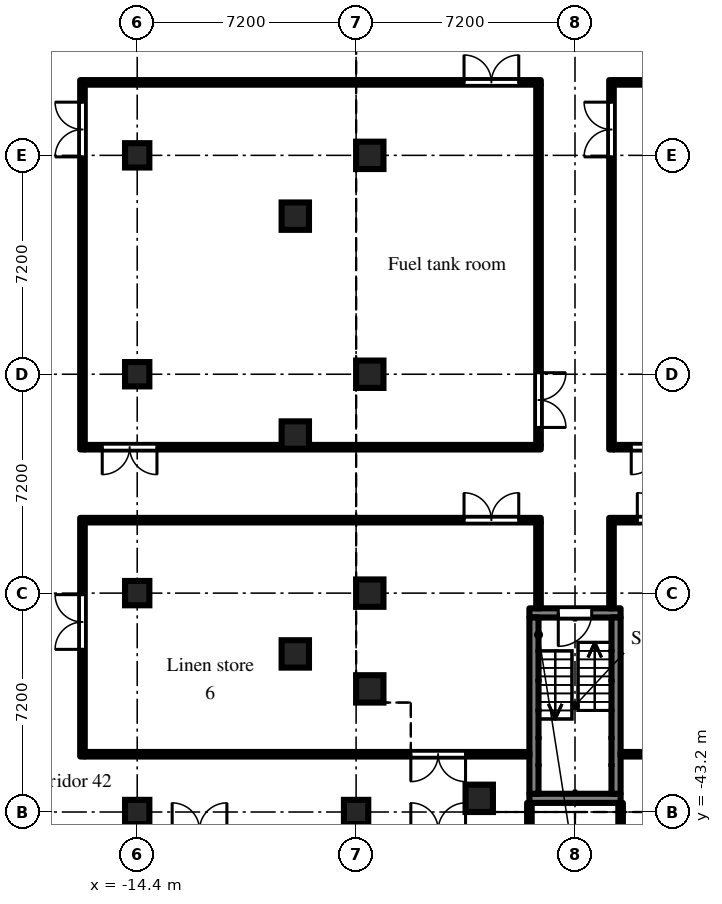
"""IFC4 building model, lengths in metres.
Left out: names, types, materials, properties, quantities, classifications, styles, units other than length and angle.
Written with IfcOpenShell. Run it as: python <this file> out.ifc"""

import sys

from ifc_helpers import new_model, si_unit, direction, frame, frame_2d, origin, origin_2d, place, context, subcontext, project, spatial, rectangle, extrude, element, fill, save


model = new_model("IFC4")
c1 = context("Model", 3, precision=1e-05, world=origin(), true_north=direction((0.0, 1.0)))
c2 = subcontext(c1, "Body", "Model", "MODEL_VIEW")
j1 = project(units=[si_unit("LENGTHUNIT", "METRE"), si_unit("PLANEANGLEUNIT", "RADIAN")], contexts=[c1])
p1 = place(None, origin())
s1 = spatial("IfcSite", under=j1, at=p1, CompositionType="ELEMENT")
p2 = place(p1, origin())
s2 = spatial("IfcBuilding", under=s1, at=p2, CompositionType="ELEMENT")
p3 = place(p2, frame((0.0, 0.0, -4.8)))
s3 = spatial("IfcBuildingStorey", under=s2, at=p3, CompositionType="ELEMENT", Elevation=-4.8)
for number, where, z_axis, x_axis in (
    (1, (-6.75, -39.15, -0.5), (0.0, 0.0, 1.0), (1.0, 0.0, 0.0)),
    (2, (-6.75, -36.0, -0.5), (0.0, 0.0, 1.0), (1.0, 0.0, 0.0)),
    (3, (-6.75, -28.8, -0.5), (0.0, 0.0, 1.0), (1.0, 0.0, 0.0)),
    (4, (-6.75, -21.6, -0.5), (0.0, 0.0, 1.0), (1.0, 0.0, 0.0)),
    (5, (-3.15, -42.75, -0.5), (0.0, 0.0, 1.0), (1.0, 0.0, 0.0)),
):
    element("IfcColumn", number, at=place(p3, frame(where, z_axis=z_axis, x_axis=x_axis)), inside=s3, PredefinedType="COLUMN", context=c2, shape_type="SweptSolid", body=[
        extrude(rectangle(XDim=0.9, YDim=0.9, at=origin_2d()), origin(), (0.0, 0.0, 1.0), 5.3),
    ])
for number, where, z_axis, x_axis in (
    (6, (-14.4, -43.2, -0.5), (0.0, 0.0, 1.0), (1.0, 0.0, 0.0)),
    (7, (-14.4, -36.0, -0.5), (0.0, 0.0, 1.0), (1.0, 0.0, 0.0)),
    (8, (-14.4, -28.8, -0.5), (0.0, 0.0, 1.0), (1.0, 0.0, 0.0)),
    (9, (-14.4, -21.6, -0.5), (0.0, 0.0, 1.0), (1.0, 0.0, 0.0)),
    (10, (-7.2, -43.2, -0.5), (0.0, 0.0, 1.0), (1.0, 0.0, 0.0)),
):
    element("IfcColumn", number, at=place(p3, frame(where, z_axis=z_axis, x_axis=x_axis)), inside=s3, PredefinedType="COLUMN", context=c2, shape_type="SweptSolid", body=[
        extrude(rectangle(XDim=0.8, YDim=0.8, at=origin_2d()), origin(), (0.0, 0.0, 1.0), 5.3),
    ])
for number, where, z_axis, x_axis in (
    (11, (-9.2, -38.0, -0.5), (0.0, 0.0, 1.0), (1.0, 0.0, 0.0)),
    (12, (-9.2, -30.8, -0.5), (0.0, 0.0, 1.0), (1.0, 0.0, 0.0)),
    (13, (-9.2, -23.6, -0.5), (0.0, 0.0, 1.0), (1.0, 0.0, 0.0)),
):
    element("IfcColumn", number, at=place(p3, frame(where, z_axis=z_axis, x_axis=x_axis)), inside=s3, PredefinedType="COLUMN", context=c2, shape_type="SweptSolid", body=[
        extrude(rectangle(XDim=0.9, YDim=0.9, at=origin_2d()), origin(), (0.0, 0.0, 1.0), 5.3),
    ])
p4 = place(p3, frame((-1.5, -36.65, 0.0), z_axis=(0.0, 0.0, 1.0), x_axis=(1.0, 0.0, 0.0)))
e14 = element("IfcWall", 14, at=p4, inside=s3, PredefinedType="SHEAR", context=c2, shape_type="SweptSolid", body=[
    extrude(rectangle(XDim=3.0, YDim=0.3, at=frame_2d((1.5, 0.0))), origin(), (0.0, 0.0, 1.0), 4.35),
])
p5 = place(p4, frame((0.95, 0.0, 0.0)))
e15 = element("IfcOpeningElement", 15, at=p5, cuts=e14, PredefinedType="OPENING", context=c2, shape_type="SweptSolid", body=[
    extrude(rectangle(XDim=1.1, YDim=2.1, at=frame_2d((0.55, 1.05))), frame((0.0, 0.16, 0.0), z_axis=(0.0, -1.0, 0.0), x_axis=(1.0, 0.0, 0.0)), (0.0, 0.0, 1.0), 0.32),
])
p6 = place(p3, frame((-1.5, -42.75, 0.0), z_axis=(0.0, 0.0, 1.0), x_axis=(1.0, 0.0, 0.0)))
e16 = element("IfcWall", 16, at=p6, inside=s3, PredefinedType="SHEAR", context=c2, shape_type="SweptSolid", body=[
    extrude(rectangle(XDim=3.0, YDim=0.3, at=frame_2d((1.5, 0.0))), origin(), (0.0, 0.0, 1.0), 4.35),
])
for number, where, z_axis, x_axis in (
    (17, (-1.35, -36.8, 0.0), (0.0, 0.0, 1.0), (0.0, -1.0, 0.0)),
    (18, (1.35, -36.8, 0.0), (0.0, 0.0, 1.0), (0.0, -1.0, 0.0)),
):
    element("IfcWall", number, at=place(p3, frame(where, z_axis=z_axis, x_axis=x_axis)), inside=s3, PredefinedType="SHEAR", context=c2, shape_type="SweptSolid", body=[
        extrude(rectangle(XDim=5.8, YDim=0.3, at=frame_2d((2.9, 0.0))), origin(), (0.0, 0.0, 1.0), 4.35),
    ])
p7 = place(p3, frame((-16.2, -41.375, 0.0), z_axis=(0.0, 0.0, 1.0), x_axis=(0.0, 1.0, 0.0)))
e19 = element("IfcWall", 19, at=p7, inside=s3, PredefinedType="PARTITIONING", context=c2, shape_type="SweptSolid", body=[
    extrude(rectangle(XDim=7.85, YDim=0.15, at=frame_2d((3.925, 0.0))), origin(), (0.0, 0.0, 1.0), 4.35),
])
p8 = place(p7, frame((3.525, 0.0, 0.0)))
e20 = element("IfcOpeningElement", 20, at=p8, cuts=e19, PredefinedType="OPENING", context=c2, shape_type="SweptSolid", body=[
    extrude(rectangle(XDim=1.8, YDim=2.1, at=frame_2d((0.9, 1.05))), frame((0.0, 0.085, 0.0), z_axis=(0.0, -1.0, 0.0), x_axis=(1.0, 0.0, 0.0)), (0.0, 0.0, 1.0), 0.17),
])
p9 = place(p3, frame((-16.125, -41.3, 0.0), z_axis=(0.0, 0.0, 1.0), x_axis=(1.0, 0.0, 0.0)))
e21 = element("IfcWall", 21, at=p9, inside=s3, PredefinedType="PARTITIONING", context=c2, shape_type="SweptSolid", body=[
    extrude(rectangle(XDim=14.625, YDim=0.15, at=frame_2d((7.312, 0.0))), origin(), (0.0, 0.0, 1.0), 4.35),
])
p10 = place(p9, frame((10.725, 0.0, 0.0)))
e22 = element("IfcOpeningElement", 22, at=p10, cuts=e21, PredefinedType="OPENING", context=c2, shape_type="SweptSolid", body=[
    extrude(rectangle(XDim=1.8, YDim=2.1, at=frame_2d((0.9, 1.05))), frame((0.0, 0.085, 0.0), z_axis=(0.0, -1.0, 0.0), x_axis=(1.0, 0.0, 0.0)), (0.0, 0.0, 1.0), 0.17),
])
p11 = place(p3, frame((-16.125, -33.6, 0.0), z_axis=(0.0, 0.0, 1.0), x_axis=(1.0, 0.0, 0.0)))
e23 = element("IfcWall", 23, at=p11, inside=s3, PredefinedType="PARTITIONING", context=c2, shape_type="SweptSolid", body=[
    extrude(rectangle(XDim=15.0, YDim=0.15, at=frame_2d((7.5, 0.0))), origin(), (0.0, 0.0, 1.0), 4.35),
])
p12 = place(p11, frame((12.475, 0.0, 0.0)))
e24 = element("IfcOpeningElement", 24, at=p12, cuts=e23, PredefinedType="OPENING", context=c2, shape_type="SweptSolid", body=[
    extrude(rectangle(XDim=1.8, YDim=2.1, at=frame_2d((0.9, 1.05))), frame((0.0, 0.085, 0.0), z_axis=(0.0, -1.0, 0.0), x_axis=(1.0, 0.0, 0.0)), (0.0, 0.0, 1.0), 0.17),
])
p13 = place(p3, frame((-16.2, -31.275, 0.0), z_axis=(0.0, 0.0, 1.0), x_axis=(0.0, 1.0, 0.0)))
e25 = element("IfcWall", 25, at=p13, inside=s3, PredefinedType="PARTITIONING", context=c2, shape_type="SweptSolid", body=[
    extrude(rectangle(XDim=12.15, YDim=0.15, at=frame_2d((6.075, 0.0))), origin(), (0.0, 0.0, 1.0), 4.35),
])
p14 = place(p13, frame((9.625, 0.0, 0.0)))
e26 = element("IfcOpeningElement", 26, at=p14, cuts=e25, PredefinedType="OPENING", context=c2, shape_type="SweptSolid", body=[
    extrude(rectangle(XDim=1.8, YDim=2.1, at=frame_2d((0.9, 1.05))), frame((0.0, 0.085, 0.0), z_axis=(0.0, -1.0, 0.0), x_axis=(1.0, 0.0, 0.0)), (0.0, 0.0, 1.0), 0.17),
])
p15 = place(p3, frame((-16.125, -31.2, 0.0), z_axis=(0.0, 0.0, 1.0), x_axis=(1.0, 0.0, 0.0)))
e27 = element("IfcWall", 27, at=p15, inside=s3, PredefinedType="PARTITIONING", context=c2, shape_type="SweptSolid", body=[
    extrude(rectangle(XDim=15.0, YDim=0.15, at=frame_2d((7.5, 0.0))), origin(), (0.0, 0.0, 1.0), 4.35),
])
p16 = place(p15, frame((0.575, 0.0, 0.0)))
e28 = element("IfcOpeningElement", 28, at=p16, cuts=e27, PredefinedType="OPENING", context=c2, shape_type="SweptSolid", body=[
    extrude(rectangle(XDim=1.8, YDim=2.1, at=frame_2d((0.9, 1.05))), frame((0.0, 0.085, 0.0), z_axis=(0.0, -1.0, 0.0), x_axis=(1.0, 0.0, 0.0)), (0.0, 0.0, 1.0), 0.17),
])
p17 = place(p3, frame((-16.125, -19.2, 0.0), z_axis=(0.0, 0.0, 1.0), x_axis=(1.0, 0.0, 0.0)))
e29 = element("IfcWall", 29, at=p17, inside=s3, PredefinedType="PARTITIONING", context=c2, shape_type="SweptSolid", body=[
    extrude(rectangle(XDim=15.0, YDim=0.15, at=frame_2d((7.5, 0.0))), origin(), (0.0, 0.0, 1.0), 4.35),
])
p18 = place(p17, frame((12.475, 0.0, 0.0)))
e30 = element("IfcOpeningElement", 30, at=p18, cuts=e29, PredefinedType="OPENING", context=c2, shape_type="SweptSolid", body=[
    extrude(rectangle(XDim=1.8, YDim=2.1, at=frame_2d((0.9, 1.05))), frame((0.0, 0.085, 0.0), z_axis=(0.0, -1.0, 0.0), x_axis=(1.0, 0.0, 0.0)), (0.0, 0.0, 1.0), 0.17),
])
p19 = place(p3, frame((-1.5, -43.725, 0.0), z_axis=(0.0, 0.0, 1.0), x_axis=(0.0, 1.0, 0.0)))
e31 = element("IfcWall", 31, at=p19, inside=s3, PredefinedType="PARTITIONING", context=c2, shape_type="SweptSolid", body=[
    extrude(rectangle(XDim=0.825, YDim=0.15, at=frame_2d((0.413, 0.0))), origin(), (0.0, 0.0, 1.0), 4.35),
])
p20 = place(p3, frame((-1.2, -36.5, 0.0), z_axis=(0.0, 0.0, 1.0), x_axis=(0.0, 1.0, 0.0)))
e32 = element("IfcWall", 32, at=p20, inside=s3, PredefinedType="PARTITIONING", context=c2, shape_type="SweptSolid", body=[
    extrude(rectangle(XDim=2.825, YDim=0.15, at=frame_2d((1.413, 0.0))), origin(), (0.0, 0.0, 1.0), 4.35),
])
p21 = place(p3, frame((-1.2, -31.125, 0.0), z_axis=(0.0, 0.0, 1.0), x_axis=(0.0, 1.0, 0.0)))
e33 = element("IfcWall", 33, at=p21, inside=s3, PredefinedType="PARTITIONING", context=c2, shape_type="SweptSolid", body=[
    extrude(rectangle(XDim=11.85, YDim=0.15, at=frame_2d((5.925, 0.0))), origin(), (0.0, 0.0, 1.0), 4.35),
])
p22 = place(p21, frame((0.575, 0.0, 0.0)))
e34 = element("IfcOpeningElement", 34, at=p22, cuts=e33, PredefinedType="OPENING", context=c2, shape_type="SweptSolid", body=[
    extrude(rectangle(XDim=1.8, YDim=2.1, at=frame_2d((0.9, 1.05))), frame((0.0, 0.085, 0.0), z_axis=(0.0, -1.0, 0.0), x_axis=(1.0, 0.0, 0.0)), (0.0, 0.0, 1.0), 0.17),
])
p23 = place(p3, frame((1.2, -36.5, 0.0), z_axis=(0.0, 0.0, 1.0), x_axis=(0.0, 1.0, 0.0)))
e35 = element("IfcWall", 35, at=p23, inside=s3, PredefinedType="PARTITIONING", context=c2, shape_type="SweptSolid", body=[
    extrude(rectangle(XDim=2.975, YDim=0.15, at=frame_2d((1.488, 0.0))), origin(), (0.0, 0.0, 1.0), 4.35),
])
p24 = place(p3, frame((1.275, -33.6, 0.0), z_axis=(0.0, 0.0, 1.0), x_axis=(1.0, 0.0, 0.0)))
e36 = element("IfcWall", 36, at=p24, inside=s3, PredefinedType="PARTITIONING", context=c2, shape_type="SweptSolid", body=[
    extrude(rectangle(XDim=15.0, YDim=0.15, at=frame_2d((7.5, 0.0))), origin(), (0.0, 0.0, 1.0), 4.35),
])
p25 = place(p24, frame((0.775, 0.0, 0.0)))
e37 = element("IfcOpeningElement", 37, at=p25, cuts=e36, PredefinedType="OPENING", context=c2, shape_type="SweptSolid", body=[
    extrude(rectangle(XDim=1.8, YDim=2.1, at=frame_2d((0.9, 1.05))), frame((0.0, 0.085, 0.0), z_axis=(0.0, -1.0, 0.0), x_axis=(1.0, 0.0, 0.0)), (0.0, 0.0, 1.0), 0.17),
])
p26 = place(p3, frame((1.2, -31.275, 0.0), z_axis=(0.0, 0.0, 1.0), x_axis=(0.0, 1.0, 0.0)))
e38 = element("IfcWall", 38, at=p26, inside=s3, PredefinedType="PARTITIONING", context=c2, shape_type="SweptSolid", body=[
    extrude(rectangle(XDim=12.15, YDim=0.15, at=frame_2d((6.075, 0.0))), origin(), (0.0, 0.0, 1.0), 4.35),
])
p27 = place(p26, frame((9.625, 0.0, 0.0)))
e39 = element("IfcOpeningElement", 39, at=p27, cuts=e38, PredefinedType="OPENING", context=c2, shape_type="SweptSolid", body=[
    extrude(rectangle(XDim=1.8, YDim=2.1, at=frame_2d((0.9, 1.05))), frame((0.0, 0.085, 0.0), z_axis=(0.0, -1.0, 0.0), x_axis=(1.0, 0.0, 0.0)), (0.0, 0.0, 1.0), 0.17),
])
p28 = place(p3, frame((1.275, -31.2, 0.0), z_axis=(0.0, 0.0, 1.0), x_axis=(1.0, 0.0, 0.0)))
e40 = element("IfcWall", 40, at=p28, inside=s3, PredefinedType="PARTITIONING", context=c2, shape_type="SweptSolid", body=[
    extrude(rectangle(XDim=15.0, YDim=0.15, at=frame_2d((7.5, 0.0))), origin(), (0.0, 0.0, 1.0), 4.35),
])
p29 = place(p28, frame((0.575, 0.0, 0.0)))
e41 = element("IfcOpeningElement", 41, at=p29, cuts=e40, PredefinedType="OPENING", context=c2, shape_type="SweptSolid", body=[
    extrude(rectangle(XDim=1.8, YDim=2.1, at=frame_2d((0.9, 1.05))), frame((0.0, 0.085, 0.0), z_axis=(0.0, -1.0, 0.0), x_axis=(1.0, 0.0, 0.0)), (0.0, 0.0, 1.0), 0.17),
])
p30 = place(p3, frame((1.275, -19.2, 0.0), z_axis=(0.0, 0.0, 1.0), x_axis=(1.0, 0.0, 0.0)))
e42 = element("IfcWall", 42, at=p30, inside=s3, PredefinedType="PARTITIONING", context=c2, shape_type="SweptSolid", body=[
    extrude(rectangle(XDim=15.0, YDim=0.15, at=frame_2d((7.5, 0.0))), origin(), (0.0, 0.0, 1.0), 4.35),
])
p31 = place(p30, frame((12.475, 0.0, 0.0)))
e43 = element("IfcOpeningElement", 43, at=p31, cuts=e42, PredefinedType="OPENING", context=c2, shape_type="SweptSolid", body=[
    extrude(rectangle(XDim=1.8, YDim=2.1, at=frame_2d((0.9, 1.05))), frame((0.0, 0.085, 0.0), z_axis=(0.0, -1.0, 0.0), x_axis=(1.0, 0.0, 0.0)), (0.0, 0.0, 1.0), 0.17),
])
p32 = place(p3, frame((1.5, -43.875, 0.0), z_axis=(0.0, 0.0, 1.0), x_axis=(0.0, 1.0, 0.0)))
e44 = element("IfcWall", 44, at=p32, inside=s3, PredefinedType="PARTITIONING", context=c2, shape_type="SweptSolid", body=[
    extrude(rectangle(XDim=0.975, YDim=0.15, at=frame_2d((0.488, 0.0))), origin(), (0.0, 0.0, 1.0), 4.35),
])
p33 = place(p3, frame((1.5, -41.3, 0.0), z_axis=(0.0, 0.0, 1.0), x_axis=(1.0, 0.0, 0.0)))
e45 = element("IfcWall", 45, at=p33, inside=s3, PredefinedType="PARTITIONING", context=c2, shape_type="SweptSolid", body=[
    extrude(rectangle(XDim=14.775, YDim=0.15, at=frame_2d((7.387, 0.0))), origin(), (0.0, 0.0, 1.0), 4.35),
])
p34 = place(p33, frame((2.1, 0.0, 0.0)))
e46 = element("IfcOpeningElement", 46, at=p34, cuts=e45, PredefinedType="OPENING", context=c2, shape_type="SweptSolid", body=[
    extrude(rectangle(XDim=1.8, YDim=2.1, at=frame_2d((0.9, 1.05))), frame((0.0, 0.085, 0.0), z_axis=(0.0, -1.0, 0.0), x_axis=(1.0, 0.0, 0.0)), (0.0, 0.0, 1.0), 0.17),
])
p35 = place(p5, frame((1.1, 0.0, 0.0), z_axis=(0.0, 0.0, 1.0), x_axis=(-1.0, 0.0, 0.0)))
e47 = element("IfcDoor", 47, at=p35, inside=s3, OperationType="SINGLE_SWING_RIGHT", PredefinedType="DOOR", context=c2, shape_type="SweptSolid", body=[
    extrude(rectangle(XDim=1.1, YDim=2.1, at=frame_2d((0.55, 1.05))), frame((0.0, 0.025, 0.0), z_axis=(0.0, -1.0, 0.0), x_axis=(1.0, 0.0, 0.0)), (0.0, 0.0, 1.0), 0.05),
])
fill(e15, e47)
p36 = place(p8, origin())
e48 = element("IfcDoor", 48, at=p36, inside=s3, OperationType="DOUBLE_DOOR_DOUBLE_SWING", PredefinedType="DOOR", context=c2, shape_type="SweptSolid", body=[
    extrude(rectangle(XDim=1.8, YDim=2.1, at=frame_2d((0.9, 1.05))), frame((0.0, 0.025, 0.0), z_axis=(0.0, -1.0, 0.0), x_axis=(1.0, 0.0, 0.0)), (0.0, 0.0, 1.0), 0.05),
])
fill(e20, e48)
p37 = place(p10, frame((1.8, 0.0, 0.0), z_axis=(0.0, 0.0, 1.0), x_axis=(-1.0, 0.0, 0.0)))
e49 = element("IfcDoor", 49, at=p37, inside=s3, OperationType="DOUBLE_DOOR_DOUBLE_SWING", PredefinedType="DOOR", context=c2, shape_type="SweptSolid", body=[
    extrude(rectangle(XDim=1.8, YDim=2.1, at=frame_2d((0.9, 1.05))), frame((0.0, 0.025, 0.0), z_axis=(0.0, -1.0, 0.0), x_axis=(1.0, 0.0, 0.0)), (0.0, 0.0, 1.0), 0.05),
])
fill(e22, e49)
p38 = place(p12, origin())
e50 = element("IfcDoor", 50, at=p38, inside=s3, OperationType="DOUBLE_DOOR_DOUBLE_SWING", PredefinedType="DOOR", context=c2, shape_type="SweptSolid", body=[
    extrude(rectangle(XDim=1.8, YDim=2.1, at=frame_2d((0.9, 1.05))), frame((0.0, 0.025, 0.0), z_axis=(0.0, -1.0, 0.0), x_axis=(1.0, 0.0, 0.0)), (0.0, 0.0, 1.0), 0.05),
])
fill(e24, e50)
p39 = place(p25, origin())
e51 = element("IfcDoor", 51, at=p39, inside=s3, OperationType="DOUBLE_DOOR_DOUBLE_SWING", PredefinedType="DOOR", context=c2, shape_type="SweptSolid", body=[
    extrude(rectangle(XDim=1.8, YDim=2.1, at=frame_2d((0.9, 1.05))), frame((0.0, 0.025, 0.0), z_axis=(0.0, -1.0, 0.0), x_axis=(1.0, 0.0, 0.0)), (0.0, 0.0, 1.0), 0.05),
])
fill(e37, e51)
p40 = place(p14, origin())
e52 = element("IfcDoor", 52, at=p40, inside=s3, OperationType="DOUBLE_DOOR_DOUBLE_SWING", PredefinedType="DOOR", context=c2, shape_type="SweptSolid", body=[
    extrude(rectangle(XDim=1.8, YDim=2.1, at=frame_2d((0.9, 1.05))), frame((0.0, 0.025, 0.0), z_axis=(0.0, -1.0, 0.0), x_axis=(1.0, 0.0, 0.0)), (0.0, 0.0, 1.0), 0.05),
])
fill(e26, e52)
p41 = place(p16, frame((1.8, 0.0, 0.0), z_axis=(0.0, 0.0, 1.0), x_axis=(-1.0, 0.0, 0.0)))
e53 = element("IfcDoor", 53, at=p41, inside=s3, OperationType="DOUBLE_DOOR_DOUBLE_SWING", PredefinedType="DOOR", context=c2, shape_type="SweptSolid", body=[
    extrude(rectangle(XDim=1.8, YDim=2.1, at=frame_2d((0.9, 1.05))), frame((0.0, 0.025, 0.0), z_axis=(0.0, -1.0, 0.0), x_axis=(1.0, 0.0, 0.0)), (0.0, 0.0, 1.0), 0.05),
])
fill(e28, e53)
p42 = place(p18, origin())
e54 = element("IfcDoor", 54, at=p42, inside=s3, OperationType="DOUBLE_DOOR_DOUBLE_SWING", PredefinedType="DOOR", context=c2, shape_type="SweptSolid", body=[
    extrude(rectangle(XDim=1.8, YDim=2.1, at=frame_2d((0.9, 1.05))), frame((0.0, 0.025, 0.0), z_axis=(0.0, -1.0, 0.0), x_axis=(1.0, 0.0, 0.0)), (0.0, 0.0, 1.0), 0.05),
])
fill(e30, e54)
p43 = place(p22, frame((1.8, 0.0, 0.0), z_axis=(0.0, 0.0, 1.0), x_axis=(-1.0, 0.0, 0.0)))
e55 = element("IfcDoor", 55, at=p43, inside=s3, OperationType="DOUBLE_DOOR_DOUBLE_SWING", PredefinedType="DOOR", context=c2, shape_type="SweptSolid", body=[
    extrude(rectangle(XDim=1.8, YDim=2.1, at=frame_2d((0.9, 1.05))), frame((0.0, 0.025, 0.0), z_axis=(0.0, -1.0, 0.0), x_axis=(1.0, 0.0, 0.0)), (0.0, 0.0, 1.0), 0.05),
])
fill(e34, e55)
p44 = place(p27, origin())
e56 = element("IfcDoor", 56, at=p44, inside=s3, OperationType="DOUBLE_DOOR_DOUBLE_SWING", PredefinedType="DOOR", context=c2, shape_type="SweptSolid", body=[
    extrude(rectangle(XDim=1.8, YDim=2.1, at=frame_2d((0.9, 1.05))), frame((0.0, 0.025, 0.0), z_axis=(0.0, -1.0, 0.0), x_axis=(1.0, 0.0, 0.0)), (0.0, 0.0, 1.0), 0.05),
])
fill(e39, e56)
p45 = place(p29, frame((1.8, 0.0, 0.0), z_axis=(0.0, 0.0, 1.0), x_axis=(-1.0, 0.0, 0.0)))
e57 = element("IfcDoor", 57, at=p45, inside=s3, OperationType="DOUBLE_DOOR_DOUBLE_SWING", PredefinedType="DOOR", context=c2, shape_type="SweptSolid", body=[
    extrude(rectangle(XDim=1.8, YDim=2.1, at=frame_2d((0.9, 1.05))), frame((0.0, 0.025, 0.0), z_axis=(0.0, -1.0, 0.0), x_axis=(1.0, 0.0, 0.0)), (0.0, 0.0, 1.0), 0.05),
])
fill(e41, e57)
save(model, sys.argv[1])
